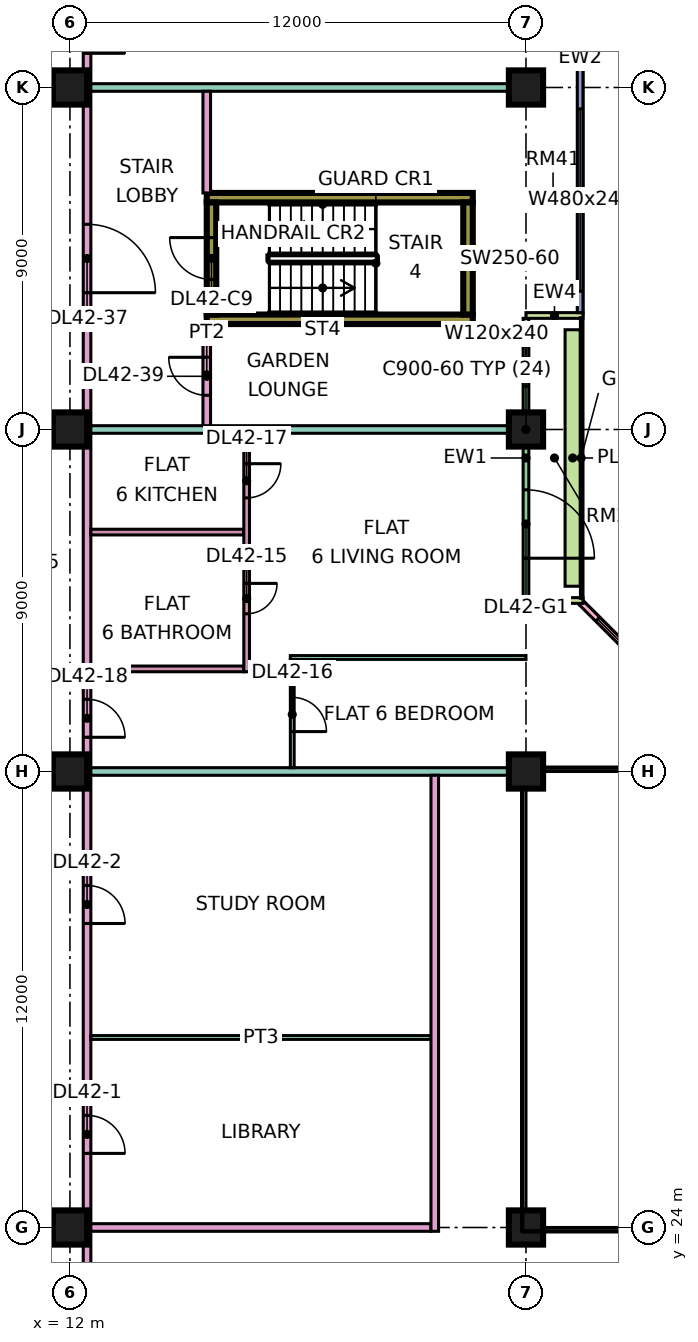
"""IFC4 building model, lengths in metres.
Left out: names, types, materials, properties, quantities, classifications, styles, units other than length and angle.
Written with IfcOpenShell. Run it as: python <this file> out.ifc"""

import sys

from ifc_helpers import new_model, si_unit, direction, frame, frame_2d, origin, origin_2d, place, context, subcontext, project, spatial, rectangle, extrude, element, fill, save


model = new_model("IFC4")
c1 = context("Model", 3, precision=1e-05, world=origin(), true_north=direction((0.0, 1.0)))
c2 = subcontext(c1, "Body", "Model", "MODEL_VIEW")
j1 = project(units=[si_unit("LENGTHUNIT", "METRE"), si_unit("PLANEANGLEUNIT", "RADIAN")], contexts=[c1])
p1 = place(None, origin())
s1 = spatial("IfcSite", under=j1, at=p1, CompositionType="ELEMENT")
p2 = place(p1, origin())
s2 = spatial("IfcBuilding", under=s1, at=p2, CompositionType="ELEMENT")
p3 = place(p2, frame((0.0, 0.0, 183.65)))
s3 = spatial("IfcBuildingStorey", under=s2, at=p3, CompositionType="ELEMENT", Elevation=183.65)
for number, where, z_axis, x_axis in (
    (1, (12.0, 24.0, 0.0), (0.0, 0.0, 1.0), (1.0, 0.0, 0.0)),
    (2, (12.0, 36.0, 0.0), (0.0, 0.0, 1.0), (1.0, 0.0, 0.0)),
    (3, (12.0, 45.0, 0.0), (0.0, 0.0, 1.0), (1.0, 0.0, 0.0)),
    (4, (12.0, 54.0, 0.0), (0.0, 0.0, 1.0), (1.0, 0.0, 0.0)),
    (5, (24.0, 24.0, 0.0), (0.0, 0.0, 1.0), (1.0, 0.0, 0.0)),
    (6, (24.0, 36.0, 0.0), (0.0, 0.0, 1.0), (1.0, 0.0, 0.0)),
    (7, (24.0, 45.0, 0.0), (0.0, 0.0, 1.0), (1.0, 0.0, 0.0)),
    (8, (24.0, 54.0, 0.0), (0.0, 0.0, 1.0), (1.0, 0.0, 0.0)),
):
    element("IfcColumn", number, at=place(p3, frame(where, z_axis=z_axis, x_axis=x_axis)), inside=s3, PredefinedType="COLUMN", context=c2, shape_type="SweptSolid", body=[
        extrude(rectangle(XDim=0.9, YDim=0.9, at=origin_2d()), origin(), (0.0, 0.0, 1.0), 3.75),
    ])
for number, where, z_axis, x_axis in (
    (9, (15.6, 47.9, 0.0), (0.0, 0.0, 1.0), (1.0, 0.0, 0.0)),
    (10, (15.6, 51.1, 0.0), (0.0, 0.0, 1.0), (1.0, 0.0, 0.0)),
):
    element("IfcWall", number, at=place(p3, frame(where, z_axis=z_axis, x_axis=x_axis)), inside=s3, PredefinedType="SHEAR", context=c2, shape_type="SweptSolid", body=[
        extrude(rectangle(XDim=7.0, YDim=0.25, at=frame_2d((3.5, 0.0))), origin(), (0.0, 0.0, 1.0), 3.75),
    ])
p4 = place(p3, frame((15.725, 48.025, 0.0), z_axis=(0.0, 0.0, 1.0), x_axis=(0.0, 1.0, 0.0)))
e11 = element("IfcWall", 11, at=p4, inside=s3, PredefinedType="SHEAR", context=c2, shape_type="SweptSolid", body=[
    extrude(rectangle(XDim=2.95, YDim=0.25, at=frame_2d((1.475, 0.0))), origin(), (0.0, 0.0, 1.0), 3.75),
])
p5 = place(p4, frame((0.925, 0.0, 0.0)))
e12 = element("IfcOpeningElement", 12, at=p5, cuts=e11, PredefinedType="OPENING", context=c2, shape_type="SweptSolid", body=[
    extrude(rectangle(XDim=1.1, YDim=2.2, at=frame_2d((0.55, 1.1))), frame((0.0, 0.135, 0.0), z_axis=(0.0, -1.0, 0.0), x_axis=(1.0, 0.0, 0.0)), (0.0, 0.0, 1.0), 0.27),
])
p6 = place(p3, frame((22.475, 48.025, 0.0), z_axis=(0.0, 0.0, 1.0), x_axis=(0.0, 1.0, 0.0)))
e13 = element("IfcWall", 13, at=p6, inside=s3, PredefinedType="SHEAR", context=c2, shape_type="SweptSolid", body=[
    extrude(rectangle(XDim=2.95, YDim=0.25, at=frame_2d((1.475, 0.0))), origin(), (0.0, 0.0, 1.0), 3.75),
])
p7 = place(p3, frame((28.447, 37.447, 0.0), z_axis=(0.0, 0.0, 1.0), x_axis=(-0.707106781187, 0.707106781187, 0.0)))
e14 = element("IfcWall", 14, at=p7, inside=s3, PredefinedType="SOLIDWALL", context=c2, shape_type="SweptSolid", body=[
    extrude(rectangle(XDim=4.243, YDim=0.15, at=frame_2d((2.121, 0.0))), origin(), (0.0, 0.0, 1.0), 3.35),
])
p8 = place(p7, frame((0.621, 0.0, 0.45)))
e15 = element("IfcOpeningElement", 15, at=p8, cuts=e14, PredefinedType="OPENING", context=c2, shape_type="SweptSolid", body=[
    extrude(rectangle(XDim=3.0, YDim=2.4, at=frame_2d((1.5, 1.2))), frame((0.0, 0.085, 0.0), z_axis=(0.0, -1.0, 0.0), x_axis=(1.0, 0.0, 0.0)), (0.0, 0.0, 1.0), 0.17),
])
p9 = place(p3, frame((24.0, 40.575, 0.0), z_axis=(0.0, 0.0, 1.0), x_axis=(0.0, 1.0, 0.0)))
e16 = element("IfcWall", 16, at=p9, inside=s3, PredefinedType="SOLIDWALL", context=c2, shape_type="SweptSolid", body=[
    extrude(rectangle(XDim=7.35, YDim=0.15, at=frame_2d((3.675, 0.0))), origin(), (0.0, 0.0, 1.0), 3.35),
])
p10 = place(p9, frame((1.038, 0.0, 0.0)))
e17 = element("IfcOpeningElement", 17, at=p10, cuts=e16, PredefinedType="OPENING", context=c2, shape_type="SweptSolid", body=[
    extrude(rectangle(XDim=1.8, YDim=2.4, at=frame_2d((0.9, 1.2))), frame((0.0, 0.085, 0.0), z_axis=(0.0, -1.0, 0.0), x_axis=(1.0, 0.0, 0.0)), (0.0, 0.0, 1.0), 0.17),
])
p11 = place(p9, frame((5.562, 0.0, 0.45)))
e18 = element("IfcOpeningElement", 18, at=p11, cuts=e16, PredefinedType="OPENING", context=c2, shape_type="SweptSolid", body=[
    extrude(rectangle(XDim=1.2, YDim=2.4, at=frame_2d((0.6, 1.2))), frame((0.0, 0.085, 0.0), z_axis=(0.0, -1.0, 0.0), x_axis=(1.0, 0.0, 0.0)), (0.0, 0.0, 1.0), 0.17),
])
for number, where, z_axis, x_axis in (
    (19, (25.5, 40.5, 0.0), (0.0, 0.0, 1.0), (-1.0, 0.0, 0.0)),
    (20, (25.5, 48.0, 0.0), (0.0, 0.0, 1.0), (-1.0, 0.0, 0.0)),
):
    element("IfcWall", number, at=place(p3, frame(where, z_axis=z_axis, x_axis=x_axis)), inside=s3, PredefinedType="SOLIDWALL", context=c2, shape_type="SweptSolid", body=[
        extrude(rectangle(XDim=1.5, YDim=0.15, at=frame_2d((0.75, 0.0))), origin(), (0.0, 0.0, 1.0), 3.35),
    ])
p12 = place(p3, frame((25.425, 48.075, 0.0), z_axis=(0.0, 0.0, 1.0), x_axis=(0.0, 1.0, 0.0)))
e21 = element("IfcWall", 21, at=p12, inside=s3, PredefinedType="SOLIDWALL", context=c2, shape_type="SweptSolid", body=[
    extrude(rectangle(XDim=13.425, YDim=0.15, at=frame_2d((6.712, 0.0))), origin(), (0.0, 0.0, 1.0), 3.35),
])
p13 = place(p12, frame((0.562, 0.0, 0.45)))
e22 = element("IfcOpeningElement", 22, at=p13, cuts=e21, PredefinedType="OPENING", context=c2, shape_type="SweptSolid", body=[
    extrude(rectangle(XDim=4.8, YDim=2.4, at=frame_2d((2.4, 1.2))), frame((0.0, 0.085, 0.0), z_axis=(0.0, -1.0, 0.0), x_axis=(1.0, 0.0, 0.0)), (0.0, 0.0, 1.0), 0.17),
])
p14 = place(p12, frame((7.425, 0.0, 0.45)))
e23 = element("IfcOpeningElement", 23, at=p14, cuts=e21, PredefinedType="OPENING", context=c2, shape_type="SweptSolid", body=[
    extrude(rectangle(XDim=3.0, YDim=2.4, at=frame_2d((1.5, 1.2))), frame((0.0, 0.085, 0.0), z_axis=(0.0, -1.0, 0.0), x_axis=(1.0, 0.0, 0.0)), (0.0, 0.0, 1.0), 0.17),
])
p15 = place(p12, frame((12.225, 0.0, 0.45)))
e24 = element("IfcOpeningElement", 24, at=p15, cuts=e21, PredefinedType="OPENING", context=c2, shape_type="SweptSolid", body=[
    extrude(rectangle(XDim=0.9, YDim=2.4, at=frame_2d((0.45, 1.2))), frame((0.0, 0.085, 0.0), z_axis=(0.0, -1.0, 0.0), x_axis=(1.0, 0.0, 0.0)), (0.0, 0.0, 1.0), 0.17),
])
p16 = place(p3, frame((25.229, 40.875, 0.0), z_axis=(0.0, 0.0, 1.0), x_axis=(0.0, 1.0, 0.0)))
e25 = element("IfcWall", 25, at=p16, inside=s3, PredefinedType="SOLIDWALL", context=c2, shape_type="SweptSolid", body=[
    extrude(rectangle(XDim=6.75, YDim=0.4, at=frame_2d((3.375, 0.0))), origin(), (0.0, 0.0, 1.0), 0.7),
])
p17 = place(p3, frame((12.45, 20.0, 0.0), z_axis=(0.0, 0.0, 1.0), x_axis=(0.0, 1.0, 0.0)))
e26 = element("IfcWall", 26, at=p17, inside=s3, PredefinedType="PARTITIONING", context=c2, shape_type="SweptSolid", body=[
    extrude(rectangle(XDim=42.926, YDim=0.2, at=frame_2d((21.463, 0.0))), origin(), (0.0, 0.0, 1.0), 3.35),
])
p18 = place(p17, frame((5.95, 0.0, 0.0)))
e27 = element("IfcOpeningElement", 27, at=p18, cuts=e26, PredefinedType="OPENING", context=c2, shape_type="SweptSolid", body=[
    extrude(rectangle(XDim=1.0, YDim=2.1, at=frame_2d((0.5, 1.05))), frame((0.0, 0.11, 0.0), z_axis=(0.0, -1.0, 0.0), x_axis=(1.0, 0.0, 0.0)), (0.0, 0.0, 1.0), 0.22),
])
p19 = place(p17, frame((12.0, 0.0, 0.0)))
e28 = element("IfcOpeningElement", 28, at=p19, cuts=e26, PredefinedType="OPENING", context=c2, shape_type="SweptSolid", body=[
    extrude(rectangle(XDim=1.0, YDim=2.1, at=frame_2d((0.5, 1.05))), frame((0.0, 0.11, 0.0), z_axis=(0.0, -1.0, 0.0), x_axis=(1.0, 0.0, 0.0)), (0.0, 0.0, 1.0), 0.22),
])
p20 = place(p17, frame((16.9, 0.0, 0.0)))
e29 = element("IfcOpeningElement", 29, at=p20, cuts=e26, PredefinedType="OPENING", context=c2, shape_type="SweptSolid", body=[
    extrude(rectangle(XDim=1.0, YDim=2.1, at=frame_2d((0.5, 1.05))), frame((0.0, 0.11, 0.0), z_axis=(0.0, -1.0, 0.0), x_axis=(1.0, 0.0, 0.0)), (0.0, 0.0, 1.0), 0.22),
])
p21 = place(p17, frame((34.9, 0.0, 0.0)))
e30 = element("IfcOpeningElement", 30, at=p21, cuts=e26, PredefinedType="OPENING", context=c2, shape_type="SweptSolid", body=[
    extrude(rectangle(XDim=1.0, YDim=2.1, at=frame_2d((0.5, 1.05))), frame((0.0, 0.11, 0.0), z_axis=(0.0, -1.0, 0.0), x_axis=(1.0, 0.0, 0.0)), (0.0, 0.0, 1.0), 0.22),
])
p22 = place(p17, frame((1.15, 0.0, 0.0)))
e31 = element("IfcOpeningElement", 31, at=p22, cuts=e26, PredefinedType="OPENING", context=c2, shape_type="SweptSolid", body=[
    extrude(rectangle(XDim=1.8, YDim=2.1, at=frame_2d((0.9, 1.05))), frame((0.0, 0.11, 0.0), z_axis=(0.0, -1.0, 0.0), x_axis=(1.0, 0.0, 0.0)), (0.0, 0.0, 1.0), 0.22),
])
p23 = place(p17, frame((28.6, 0.0, 0.0)))
e32 = element("IfcOpeningElement", 32, at=p23, cuts=e26, PredefinedType="OPENING", context=c2, shape_type="SweptSolid", body=[
    extrude(rectangle(XDim=1.8, YDim=2.1, at=frame_2d((0.9, 1.05))), frame((0.0, 0.11, 0.0), z_axis=(0.0, -1.0, 0.0), x_axis=(1.0, 0.0, 0.0)), (0.0, 0.0, 1.0), 0.22),
])
p24 = place(p3, frame((12.55, 24.0, 0.0), z_axis=(0.0, 0.0, 1.0), x_axis=(1.0, 0.0, 0.0)))
e33 = element("IfcWall", 33, at=p24, inside=s3, PredefinedType="PARTITIONING", context=c2, shape_type="SweptSolid", body=[
    extrude(rectangle(XDim=8.95, YDim=0.2, at=frame_2d((4.475, 0.0))), origin(), (0.0, 0.0, 1.0), 3.35),
])
p25 = place(p3, frame((12.55, 29.0, 0.0), z_axis=(0.0, 0.0, 1.0), x_axis=(1.0, 0.0, 0.0)))
e34 = element("IfcWall", 34, at=p25, inside=s3, PredefinedType="PARTITIONING", context=c2, shape_type="SweptSolid", body=[
    extrude(rectangle(XDim=8.95, YDim=0.1, at=frame_2d((4.475, 0.0))), origin(), (0.0, 0.0, 1.0), 3.35),
])
p26 = place(p3, frame((12.55, 36.0, 0.0), z_axis=(0.0, 0.0, 1.0), x_axis=(1.0, 0.0, 0.0)))
e35 = element("IfcWall", 35, at=p26, inside=s3, PredefinedType="PARTITIONING", context=c2, shape_type="SweptSolid", body=[
    extrude(rectangle(XDim=11.45, YDim=0.2, at=frame_2d((5.725, 0.0))), origin(), (0.0, 0.0, 1.0), 3.35),
])
for number, where, z_axis, x_axis in (
    (36, (12.55, 38.7, 0.0), (0.0, 0.0, 1.0), (1.0, 0.0, 0.0)),
    (37, (12.55, 42.3, 0.0), (0.0, 0.0, 1.0), (1.0, 0.0, 0.0)),
):
    element("IfcWall", number, at=place(p3, frame(where, z_axis=z_axis, x_axis=x_axis)), inside=s3, PredefinedType="PARTITIONING", context=c2, shape_type="SweptSolid", body=[
        extrude(rectangle(XDim=4.025, YDim=0.15, at=frame_2d((2.012, 0.0))), origin(), (0.0, 0.0, 1.0), 3.35),
    ])
p27 = place(p3, frame((12.55, 45.0, 0.0), z_axis=(0.0, 0.0, 1.0), x_axis=(1.0, 0.0, 0.0)))
e38 = element("IfcWall", 38, at=p27, inside=s3, PredefinedType="PARTITIONING", context=c2, shape_type="SweptSolid", body=[
    extrude(rectangle(XDim=11.376, YDim=0.2, at=frame_2d((5.688, 0.0))), origin(), (0.0, 0.0, 1.0), 3.35),
])
p28 = place(p3, frame((12.55, 54.0, 0.0), z_axis=(0.0, 0.0, 1.0), x_axis=(1.0, 0.0, 0.0)))
e39 = element("IfcWall", 39, at=p28, inside=s3, PredefinedType="PARTITIONING", context=c2, shape_type="SweptSolid", body=[
    extrude(rectangle(XDim=11.45, YDim=0.2, at=frame_2d((5.725, 0.0))), origin(), (0.0, 0.0, 1.0), 3.35),
])
p29 = place(p3, frame((15.6, 45.1, 0.0), z_axis=(0.0, 0.0, 1.0), x_axis=(0.0, 1.0, 0.0)))
e40 = element("IfcWall", 40, at=p29, inside=s3, PredefinedType="PARTITIONING", context=c2, shape_type="SweptSolid", body=[
    extrude(rectangle(XDim=2.675, YDim=0.2, at=frame_2d((1.337, 0.0))), origin(), (0.0, 0.0, 1.0), 3.35),
])
p30 = place(p29, frame((0.8, 0.0, 0.0)))
e41 = element("IfcOpeningElement", 41, at=p30, cuts=e40, PredefinedType="OPENING", context=c2, shape_type="SweptSolid", body=[
    extrude(rectangle(XDim=1.0, YDim=2.1, at=frame_2d((0.5, 1.05))), frame((0.0, 0.11, 0.0), z_axis=(0.0, -1.0, 0.0), x_axis=(1.0, 0.0, 0.0)), (0.0, 0.0, 1.0), 0.22),
])
p31 = place(p3, frame((15.6, 51.225, 0.0), z_axis=(0.0, 0.0, 1.0), x_axis=(0.0, 1.0, 0.0)))
e42 = element("IfcWall", 42, at=p31, inside=s3, PredefinedType="PARTITIONING", context=c2, shape_type="SweptSolid", body=[
    extrude(rectangle(XDim=2.675, YDim=0.2, at=frame_2d((1.337, 0.0))), origin(), (0.0, 0.0, 1.0), 3.35),
])
p32 = place(p3, frame((16.65, 38.625, 0.0), z_axis=(0.0, 0.0, 1.0), x_axis=(0.0, 1.0, 0.0)))
e43 = element("IfcWall", 43, at=p32, inside=s3, PredefinedType="PARTITIONING", context=c2, shape_type="SweptSolid", body=[
    extrude(rectangle(XDim=6.275, YDim=0.15, at=frame_2d((3.137, 0.0))), origin(), (0.0, 0.0, 1.0), 3.35),
])
p33 = place(p32, frame((1.525, 0.0, 0.0)))
e44 = element("IfcOpeningElement", 44, at=p33, cuts=e43, PredefinedType="OPENING", context=c2, shape_type="SweptSolid", body=[
    extrude(rectangle(XDim=0.8, YDim=2.1, at=frame_2d((0.4, 1.05))), frame((0.0, 0.085, 0.0), z_axis=(0.0, -1.0, 0.0), x_axis=(1.0, 0.0, 0.0)), (0.0, 0.0, 1.0), 0.17),
])
p34 = place(p32, frame((4.575, 0.0, 0.0)))
e45 = element("IfcOpeningElement", 45, at=p34, cuts=e43, PredefinedType="OPENING", context=c2, shape_type="SweptSolid", body=[
    extrude(rectangle(XDim=0.9, YDim=2.1, at=frame_2d((0.45, 1.05))), frame((0.0, 0.085, 0.0), z_axis=(0.0, -1.0, 0.0), x_axis=(1.0, 0.0, 0.0)), (0.0, 0.0, 1.0), 0.17),
])
p35 = place(p3, frame((17.8, 39.0, 0.0), z_axis=(0.0, 0.0, 1.0), x_axis=(1.0, 0.0, 0.0)))
e46 = element("IfcWall", 46, at=p35, inside=s3, PredefinedType="PARTITIONING", context=c2, shape_type="SweptSolid", body=[
    extrude(rectangle(XDim=6.2, YDim=0.1, at=frame_2d((3.1, 0.0))), origin(), (0.0, 0.0, 1.0), 3.35),
])
p36 = place(p3, frame((17.85, 36.1, 0.0), z_axis=(0.0, 0.0, 1.0), x_axis=(0.0, 1.0, 0.0)))
e47 = element("IfcWall", 47, at=p36, inside=s3, PredefinedType="PARTITIONING", context=c2, shape_type="SweptSolid", body=[
    extrude(rectangle(XDim=2.85, YDim=0.1, at=frame_2d((1.425, 0.0))), origin(), (0.0, 0.0, 1.0), 3.35),
])
p37 = place(p36, frame((0.95, 0.0, 0.0)))
e48 = element("IfcOpeningElement", 48, at=p37, cuts=e47, PredefinedType="OPENING", context=c2, shape_type="SweptSolid", body=[
    extrude(rectangle(XDim=0.9, YDim=2.1, at=frame_2d((0.45, 1.05))), frame((0.0, 0.06, 0.0), z_axis=(0.0, -1.0, 0.0), x_axis=(1.0, 0.0, 0.0)), (0.0, 0.0, 1.0), 0.12),
])
p38 = place(p3, frame((21.6, 23.9, 0.0), z_axis=(0.0, 0.0, 1.0), x_axis=(0.0, 1.0, 0.0)))
e49 = element("IfcWall", 49, at=p38, inside=s3, PredefinedType="PARTITIONING", context=c2, shape_type="SweptSolid", body=[
    extrude(rectangle(XDim=12.0, YDim=0.2, at=frame_2d((6.0, 0.0))), origin(), (0.0, 0.0, 1.0), 3.35),
])
p39 = place(p8, origin())
e50 = element("IfcWindow", 50, at=p39, inside=s3, PartitioningType="SINGLE_PANEL", PredefinedType="WINDOW", context=c2, shape_type="SweptSolid", body=[
    extrude(rectangle(XDim=3.0, YDim=2.4, at=frame_2d((1.5, 1.2))), frame((0.0, 0.03, 0.0), z_axis=(0.0, -1.0, 0.0), x_axis=(1.0, 0.0, 0.0)), (0.0, 0.0, 1.0), 0.06),
])
fill(e15, e50)
p40 = place(p10, frame((1.8, 0.0, 0.0), z_axis=(0.0, 0.0, 1.0), x_axis=(-1.0, 0.0, 0.0)))
e51 = element("IfcDoor", 51, at=p40, inside=s3, OperationType="DOUBLE_DOOR_SINGLE_SWING", PredefinedType="DOOR", context=c2, shape_type="SweptSolid", body=[
    extrude(rectangle(XDim=1.8, YDim=2.4, at=frame_2d((0.9, 1.2))), frame((0.0, 0.025, 0.0), z_axis=(0.0, -1.0, 0.0), x_axis=(1.0, 0.0, 0.0)), (0.0, 0.0, 1.0), 0.05),
])
fill(e17, e51)
p41 = place(p11, origin())
e52 = element("IfcWindow", 52, at=p41, inside=s3, PartitioningType="SINGLE_PANEL", PredefinedType="WINDOW", context=c2, shape_type="SweptSolid", body=[
    extrude(rectangle(XDim=1.2, YDim=2.4, at=frame_2d((0.6, 1.2))), frame((0.0, 0.03, 0.0), z_axis=(0.0, -1.0, 0.0), x_axis=(1.0, 0.0, 0.0)), (0.0, 0.0, 1.0), 0.06),
])
fill(e18, e52)
p42 = place(p13, origin())
e53 = element("IfcWindow", 53, at=p42, inside=s3, PartitioningType="SINGLE_PANEL", PredefinedType="WINDOW", context=c2, shape_type="SweptSolid", body=[
    extrude(rectangle(XDim=4.8, YDim=2.4, at=frame_2d((2.4, 1.2))), frame((0.0, 0.03, 0.0), z_axis=(0.0, -1.0, 0.0), x_axis=(1.0, 0.0, 0.0)), (0.0, 0.0, 1.0), 0.06),
])
fill(e22, e53)
p43 = place(p5, frame((1.1, 0.0, 0.0), z_axis=(0.0, 0.0, 1.0), x_axis=(-1.0, 0.0, 0.0)))
e54 = element("IfcDoor", 54, at=p43, inside=s3, OperationType="SINGLE_SWING_RIGHT", PredefinedType="DOOR", context=c2, shape_type="SweptSolid", body=[
    extrude(rectangle(XDim=1.1, YDim=2.2, at=frame_2d((0.55, 1.1))), frame((0.0, 0.025, 0.0), z_axis=(0.0, -1.0, 0.0), x_axis=(1.0, 0.0, 0.0)), (0.0, 0.0, 1.0), 0.05),
])
fill(e12, e54)
p44 = place(p18, frame((1.0, 0.0, 0.0), z_axis=(0.0, 0.0, 1.0), x_axis=(-1.0, 0.0, 0.0)))
e55 = element("IfcDoor", 55, at=p44, inside=s3, OperationType="SINGLE_SWING_LEFT", PredefinedType="DOOR", context=c2, shape_type="SweptSolid", body=[
    extrude(rectangle(XDim=1.0, YDim=2.1, at=frame_2d((0.5, 1.05))), frame((0.0, 0.025, 0.0), z_axis=(0.0, -1.0, 0.0), x_axis=(1.0, 0.0, 0.0)), (0.0, 0.0, 1.0), 0.05),
])
fill(e27, e55)
p45 = place(p19, frame((1.0, 0.0, 0.0), z_axis=(0.0, 0.0, 1.0), x_axis=(-1.0, 0.0, 0.0)))
e56 = element("IfcDoor", 56, at=p45, inside=s3, OperationType="SINGLE_SWING_LEFT", PredefinedType="DOOR", context=c2, shape_type="SweptSolid", body=[
    extrude(rectangle(XDim=1.0, YDim=2.1, at=frame_2d((0.5, 1.05))), frame((0.0, 0.025, 0.0), z_axis=(0.0, -1.0, 0.0), x_axis=(1.0, 0.0, 0.0)), (0.0, 0.0, 1.0), 0.05),
])
fill(e28, e56)
p46 = place(p33, origin())
e57 = element("IfcDoor", 57, at=p46, inside=s3, OperationType="SINGLE_SWING_RIGHT", PredefinedType="DOOR", context=c2, shape_type="SweptSolid", body=[
    extrude(rectangle(XDim=0.8, YDim=2.1, at=frame_2d((0.4, 1.05))), frame((0.0, 0.025, 0.0), z_axis=(0.0, -1.0, 0.0), x_axis=(1.0, 0.0, 0.0)), (0.0, 0.0, 1.0), 0.05),
])
fill(e44, e57)
p47 = place(p37, frame((0.9, 0.0, 0.0), z_axis=(0.0, 0.0, 1.0), x_axis=(-1.0, 0.0, 0.0)))
e58 = element("IfcDoor", 58, at=p47, inside=s3, OperationType="SINGLE_SWING_LEFT", PredefinedType="DOOR", context=c2, shape_type="SweptSolid", body=[
    extrude(rectangle(XDim=0.9, YDim=2.1, at=frame_2d((0.45, 1.05))), frame((0.0, 0.025, 0.0), z_axis=(0.0, -1.0, 0.0), x_axis=(1.0, 0.0, 0.0)), (0.0, 0.0, 1.0), 0.05),
])
fill(e48, e58)
p48 = place(p34, origin())
e59 = element("IfcDoor", 59, at=p48, inside=s3, OperationType="SINGLE_SWING_RIGHT", PredefinedType="DOOR", context=c2, shape_type="SweptSolid", body=[
    extrude(rectangle(XDim=0.9, YDim=2.1, at=frame_2d((0.45, 1.05))), frame((0.0, 0.025, 0.0), z_axis=(0.0, -1.0, 0.0), x_axis=(1.0, 0.0, 0.0)), (0.0, 0.0, 1.0), 0.05),
])
fill(e45, e59)
p49 = place(p20, frame((1.0, 0.0, 0.0), z_axis=(0.0, 0.0, 1.0), x_axis=(-1.0, 0.0, 0.0)))
e60 = element("IfcDoor", 60, at=p49, inside=s3, OperationType="SINGLE_SWING_LEFT", PredefinedType="DOOR", context=c2, shape_type="SweptSolid", body=[
    extrude(rectangle(XDim=1.0, YDim=2.1, at=frame_2d((0.5, 1.05))), frame((0.0, 0.025, 0.0), z_axis=(0.0, -1.0, 0.0), x_axis=(1.0, 0.0, 0.0)), (0.0, 0.0, 1.0), 0.05),
])
fill(e29, e60)
p50 = place(p21, frame((1.0, 0.0, 0.0), z_axis=(0.0, 0.0, 1.0), x_axis=(-1.0, 0.0, 0.0)))
e61 = element("IfcDoor", 61, at=p50, inside=s3, OperationType="SINGLE_SWING_LEFT", PredefinedType="DOOR", context=c2, shape_type="SweptSolid", body=[
    extrude(rectangle(XDim=1.0, YDim=2.1, at=frame_2d((0.5, 1.05))), frame((0.0, 0.025, 0.0), z_axis=(0.0, -1.0, 0.0), x_axis=(1.0, 0.0, 0.0)), (0.0, 0.0, 1.0), 0.05),
])
fill(e30, e61)
p51 = place(p23, frame((1.8, 0.0, 0.0), z_axis=(0.0, 0.0, 1.0), x_axis=(-1.0, 0.0, 0.0)))
e62 = element("IfcDoor", 62, at=p51, inside=s3, OperationType="DOUBLE_DOOR_SINGLE_SWING", PredefinedType="DOOR", context=c2, shape_type="SweptSolid", body=[
    extrude(rectangle(XDim=1.8, YDim=2.1, at=frame_2d((0.9, 1.05))), frame((0.0, 0.025, 0.0), z_axis=(0.0, -1.0, 0.0), x_axis=(1.0, 0.0, 0.0)), (0.0, 0.0, 1.0), 0.05),
])
fill(e32, e62)
p52 = place(p30, frame((1.0, 0.0, 0.0), z_axis=(0.0, 0.0, 1.0), x_axis=(-1.0, 0.0, 0.0)))
e63 = element("IfcDoor", 63, at=p52, inside=s3, OperationType="SINGLE_SWING_RIGHT", PredefinedType="DOOR", context=c2, shape_type="SweptSolid", body=[
    extrude(rectangle(XDim=1.0, YDim=2.1, at=frame_2d((0.5, 1.05))), frame((0.0, 0.025, 0.0), z_axis=(0.0, -1.0, 0.0), x_axis=(1.0, 0.0, 0.0)), (0.0, 0.0, 1.0), 0.05),
])
fill(e41, e63)
save(model, sys.argv[1])
